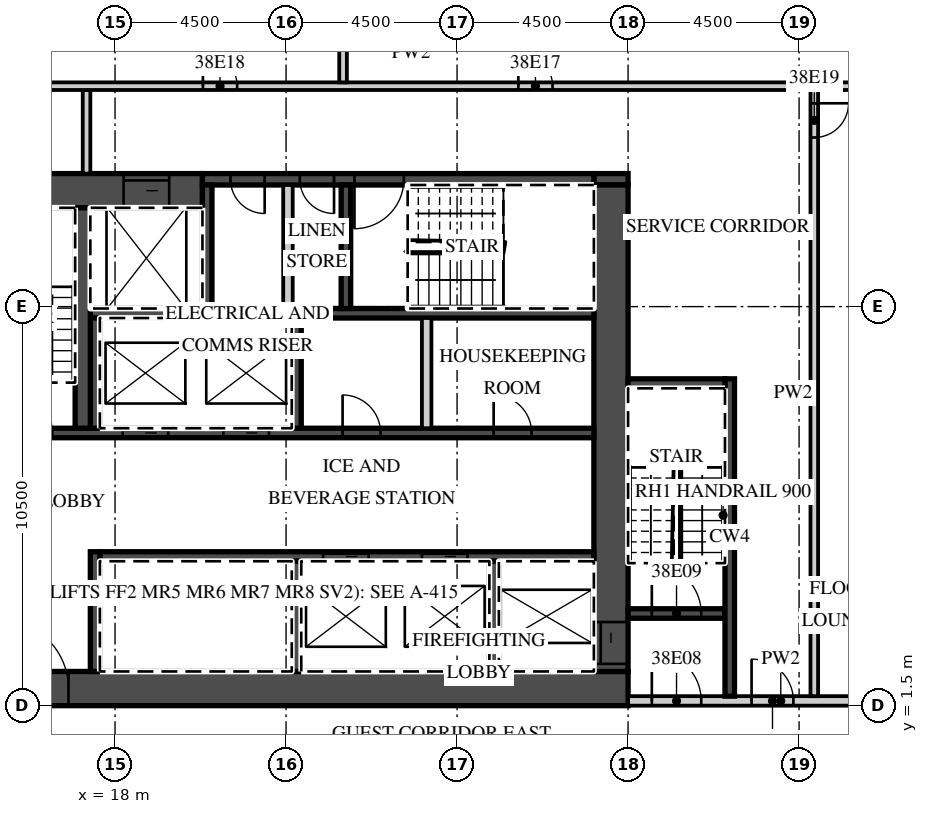
"""IFC4 building model, lengths in metres.
Left out: names, types, materials, properties, quantities, classifications, styles, units other than length and angle.
Written with IfcOpenShell. Run it as: python <this file> out.ifc"""

import sys

from ifc_helpers import new_model, si_unit, direction, frame, frame_2d, origin, place, context, subcontext, project, spatial, rectangle, extrude, element, fill, save


model = new_model("IFC4")
c1 = context("Model", 3, precision=1e-05, world=origin(), true_north=direction((0.0, 1.0)))
c2 = subcontext(c1, "Body", "Model", "MODEL_VIEW")
j1 = project(units=[si_unit("LENGTHUNIT", "METRE"), si_unit("PLANEANGLEUNIT", "RADIAN")], contexts=[c1])
p1 = place(None, origin())
s1 = spatial("IfcSite", under=j1, at=p1, CompositionType="ELEMENT")
p2 = place(p1, origin())
s2 = spatial("IfcBuilding", under=s1, at=p2, CompositionType="ELEMENT")
p3 = place(p2, frame((0.0, 0.0, 166.9)))
s3 = spatial("IfcBuildingStorey", under=s2, at=p3, CompositionType="ELEMENT", Elevation=166.9)
p4 = place(p3, frame((13.5, 1.95, 0.0), z_axis=(0.0, 0.0, 1.0), x_axis=(1.0, 0.0, 0.0)))
e1 = element("IfcWall", 1, at=p4, inside=s3, PredefinedType="SHEAR", context=c2, shape_type="SweptSolid", body=[
    extrude(rectangle(XDim=18.0, YDim=0.9, at=frame_2d((9.0, 0.0))), origin(), (0.0, 0.0, 1.0), 3.02),
])
p5 = place(p4, frame((1.475, 0.0, 0.0)))
e2 = element("IfcOpeningElement", 2, at=p5, cuts=e1, PredefinedType="OPENING", context=c2, shape_type="SweptSolid", body=[
    extrude(rectangle(XDim=1.8, YDim=2.1, at=frame_2d((0.9, 1.05))), frame((0.0, 0.46, 0.0), z_axis=(0.0, -1.0, 0.0), x_axis=(1.0, 0.0, 0.0)), (0.0, 0.0, 1.0), 0.92),
])
p6 = place(p3, frame((13.5, 15.05, 0.0), z_axis=(0.0, 0.0, 1.0), x_axis=(1.0, 0.0, 0.0)))
e3 = element("IfcWall", 3, at=p6, inside=s3, PredefinedType="SHEAR", context=c2, shape_type="SweptSolid", body=[
    extrude(rectangle(XDim=6.8, YDim=0.9, at=frame_2d((3.4, 0.0))), origin(), (0.0, 0.0, 1.0), 3.02),
])
p7 = place(p6, frame((4.725, 0.0, 0.0)))
e4 = element("IfcOpeningElement", 4, at=p7, cuts=e3, PredefinedType="OPENING", context=c2, shape_type="SweptSolid", body=[
    extrude(rectangle(XDim=1.2, YDim=2.1, at=frame_2d((0.6, 1.05))), frame((0.0, 0.46, 0.0), z_axis=(0.0, -1.0, 0.0), x_axis=(1.0, 0.0, 0.0)), (0.0, 0.0, 1.0), 0.92),
])
p8 = place(p3, frame((30.6, 15.35, 0.0), z_axis=(0.0, 0.0, 1.0), x_axis=(1.0, 0.0, 0.0)))
e5 = element("IfcWall", 5, at=p8, inside=s3, PredefinedType="SHEAR", context=c2, shape_type="SweptSolid", body=[
    extrude(rectangle(XDim=0.9, YDim=0.3, at=frame_2d((0.45, 0.0))), origin(), (0.0, 0.0, 1.0), 3.02),
])
p9 = place(p3, frame((20.3, 15.35, 0.0), z_axis=(0.0, 0.0, 1.0), x_axis=(1.0, 0.0, 0.0)))
e6 = element("IfcWall", 6, at=p9, inside=s3, PredefinedType="SHEAR", context=c2, shape_type="SweptSolid", body=[
    extrude(rectangle(XDim=10.3, YDim=0.3, at=frame_2d((5.15, 0.0))), origin(), (0.0, 0.0, 1.0), 3.02),
])
p10 = place(p9, frame((4.0, 0.0, 0.0)))
e7 = element("IfcOpeningElement", 7, at=p10, cuts=e6, PredefinedType="OPENING", context=c2, shape_type="SweptSolid", body=[
    extrude(rectangle(XDim=1.3, YDim=2.1, at=frame_2d((0.65, 1.05))), frame((0.0, 0.16, 0.0), z_axis=(0.0, -1.0, 0.0), x_axis=(1.0, 0.0, 0.0)), (0.0, 0.0, 1.0), 0.32),
])
p11 = place(p9, frame((2.562, 0.0, 0.0)))
e8 = element("IfcOpeningElement", 8, at=p11, cuts=e6, PredefinedType="OPENING", context=c2, shape_type="SweptSolid", body=[
    extrude(rectangle(XDim=0.9, YDim=2.1, at=frame_2d((0.45, 1.05))), frame((0.0, 0.16, 0.0), z_axis=(0.0, -1.0, 0.0), x_axis=(1.0, 0.0, 0.0)), (0.0, 0.0, 1.0), 0.32),
])
p12 = place(p9, frame((0.738, 0.0, 0.0)))
e9 = element("IfcOpeningElement", 9, at=p12, cuts=e6, PredefinedType="OPENING", context=c2, shape_type="SweptSolid", body=[
    extrude(rectangle(XDim=0.9, YDim=2.1, at=frame_2d((0.45, 1.05))), frame((0.0, 0.16, 0.0), z_axis=(0.0, -1.0, 0.0), x_axis=(1.0, 0.0, 0.0)), (0.0, 0.0, 1.0), 0.32),
])
p13 = place(p3, frame((31.05, 2.4, 0.0), z_axis=(0.0, 0.0, 1.0), x_axis=(0.0, 1.0, 0.0)))
e10 = element("IfcWall", 10, at=p13, inside=s3, PredefinedType="SHEAR", context=c2, shape_type="SweptSolid", body=[
    extrude(rectangle(XDim=12.8, YDim=0.9, at=frame_2d((6.4, 0.0))), origin(), (0.0, 0.0, 1.0), 3.02),
])
p14 = place(p13, frame((0.2, 0.0, 0.0)))
e11 = element("IfcOpeningElement", 11, at=p14, cuts=e10, PredefinedType="OPENING", context=c2, shape_type="SweptSolid", body=[
    extrude(rectangle(XDim=1.1, YDim=2.1, at=frame_2d((0.55, 1.05))), frame((0.0, 0.46, 0.0), z_axis=(0.0, -1.0, 0.0), x_axis=(1.0, 0.0, 0.0)), (0.0, 0.0, 1.0), 0.92),
])
p15 = place(p3, frame((17.6, 5.425, 0.0), z_axis=(0.0, 0.0, 1.0), x_axis=(1.0, 0.0, 0.0)))
e12 = element("IfcWall", 12, at=p15, inside=s3, PredefinedType="SHEAR", context=c2, shape_type="SweptSolid", body=[
    extrude(rectangle(XDim=13.0, YDim=0.25, at=frame_2d((6.5, 0.0))), origin(), (0.0, 0.0, 1.0), 3.02),
])
p16 = place(p15, frame((8.475, 0.0, 0.0)))
e13 = element("IfcOpeningElement", 13, at=p16, cuts=e12, PredefinedType="OPENING", context=c2, shape_type="SweptSolid", body=[
    extrude(rectangle(XDim=1.2, YDim=2.1, at=frame_2d((0.6, 1.05))), frame((0.0, 0.135, 0.0), z_axis=(0.0, -1.0, 0.0), x_axis=(1.0, 0.0, 0.0)), (0.0, 0.0, 1.0), 0.27),
])
p17 = place(p15, frame((5.875, 0.0, 0.0)))
e14 = element("IfcOpeningElement", 14, at=p17, cuts=e12, PredefinedType="OPENING", context=c2, shape_type="SweptSolid", body=[
    extrude(rectangle(XDim=1.2, YDim=2.1, at=frame_2d((0.6, 1.05))), frame((0.0, 0.135, 0.0), z_axis=(0.0, -1.0, 0.0), x_axis=(1.0, 0.0, 0.0)), (0.0, 0.0, 1.0), 0.27),
])
p18 = place(p3, frame((17.475, 2.4, 0.0), z_axis=(0.0, 0.0, 1.0), x_axis=(0.0, 1.0, 0.0)))
e15 = element("IfcWall", 15, at=p18, inside=s3, PredefinedType="SHEAR", context=c2, shape_type="SweptSolid", body=[
    extrude(rectangle(XDim=3.15, YDim=0.25, at=frame_2d((1.575, 0.0))), origin(), (0.0, 0.0, 1.0), 3.02),
])
for number, where, z_axis, x_axis in (
    (16, (27.975, 2.4, 0.0), (0.0, 0.0, 1.0), (0.0, 1.0, 0.0)),
    (17, (22.775, 2.4, 0.0), (0.0, 0.0, 1.0), (0.0, 1.0, 0.0)),
):
    element("IfcWall", number, at=place(p3, frame(where, z_axis=z_axis, x_axis=x_axis)), inside=s3, PredefinedType="SHEAR", context=c2, shape_type="SweptSolid", body=[
        extrude(rectangle(XDim=2.9, YDim=0.25, at=frame_2d((1.45, 0.0))), origin(), (0.0, 0.0, 1.0), 3.02),
    ])
p19 = place(p3, frame((14.4, 8.675, 0.0), z_axis=(0.0, 0.0, 1.0), x_axis=(1.0, 0.0, 0.0)))
e18 = element("IfcWall", 18, at=p19, inside=s3, PredefinedType="SHEAR", context=c2, shape_type="SweptSolid", body=[
    extrude(rectangle(XDim=16.2, YDim=0.25, at=frame_2d((8.1, 0.0))), origin(), (0.0, 0.0, 1.0), 3.02),
])
p20 = place(p19, frame((6.45, 0.0, 0.0)))
e19 = element("IfcOpeningElement", 19, at=p20, cuts=e18, PredefinedType="OPENING", context=c2, shape_type="SweptSolid", body=[
    extrude(rectangle(XDim=1.2, YDim=2.1, at=frame_2d((0.6, 1.05))), frame((0.0, 0.135, 0.0), z_axis=(0.0, -1.0, 0.0), x_axis=(1.0, 0.0, 0.0)), (0.0, 0.0, 1.0), 0.27),
])
p21 = place(p19, frame((3.8, 0.0, 0.0)))
e20 = element("IfcOpeningElement", 20, at=p21, cuts=e18, PredefinedType="OPENING", context=c2, shape_type="SweptSolid", body=[
    extrude(rectangle(XDim=1.2, YDim=2.1, at=frame_2d((0.6, 1.05))), frame((0.0, 0.135, 0.0), z_axis=(0.0, -1.0, 0.0), x_axis=(1.0, 0.0, 0.0)), (0.0, 0.0, 1.0), 0.27),
])
p22 = place(p19, frame((0.65, 0.0, 0.0)))
e21 = element("IfcOpeningElement", 21, at=p22, cuts=e18, PredefinedType="OPENING", context=c2, shape_type="SweptSolid", body=[
    extrude(rectangle(XDim=1.3, YDim=2.1, at=frame_2d((0.65, 1.05))), frame((0.0, 0.135, 0.0), z_axis=(0.0, -1.0, 0.0), x_axis=(1.0, 0.0, 0.0)), (0.0, 0.0, 1.0), 0.27),
])
p23 = place(p19, frame((13.562, 0.0, 0.0)))
e22 = element("IfcOpeningElement", 22, at=p23, cuts=e18, PredefinedType="OPENING", context=c2, shape_type="SweptSolid", body=[
    extrude(rectangle(XDim=1.0, YDim=2.1, at=frame_2d((0.5, 1.05))), frame((0.0, 0.135, 0.0), z_axis=(0.0, -1.0, 0.0), x_axis=(1.0, 0.0, 0.0)), (0.0, 0.0, 1.0), 0.27),
])
p24 = place(p19, frame((9.587, 0.0, 0.0)))
e23 = element("IfcOpeningElement", 23, at=p24, cuts=e18, PredefinedType="OPENING", context=c2, shape_type="SweptSolid", body=[
    extrude(rectangle(XDim=1.0, YDim=2.1, at=frame_2d((0.5, 1.05))), frame((0.0, 0.135, 0.0), z_axis=(0.0, -1.0, 0.0), x_axis=(1.0, 0.0, 0.0)), (0.0, 0.0, 1.0), 0.27),
])
p25 = place(p3, frame((17.35, 11.825, 0.0), z_axis=(0.0, 0.0, 1.0), x_axis=(1.0, 0.0, 0.0)))
e24 = element("IfcWall", 24, at=p25, inside=s3, PredefinedType="SHEAR", context=c2, shape_type="SweptSolid", body=[
    extrude(rectangle(XDim=13.25, YDim=0.25, at=frame_2d((6.625, 0.0))), origin(), (0.0, 0.0, 1.0), 3.02),
])
for number, where, z_axis, x_axis in (
    (25, (17.475, 8.8, 0.0), (0.0, 0.0, 1.0), (0.0, 1.0, 0.0)),
    (26, (22.775, 8.8, 0.0), (0.0, 0.0, 1.0), (0.0, 1.0, 0.0)),
):
    element("IfcWall", number, at=place(p3, frame(where, z_axis=z_axis, x_axis=x_axis)), inside=s3, PredefinedType="SHEAR", context=c2, shape_type="SweptSolid", body=[
        extrude(rectangle(XDim=2.9, YDim=0.25, at=frame_2d((1.45, 0.0))), origin(), (0.0, 0.0, 1.0), 3.02),
    ])
p26 = place(p3, frame((26.2, 8.8, 0.0), z_axis=(0.0, 0.0, 1.0), x_axis=(0.0, 1.0, 0.0)))
e27 = element("IfcWall", 27, at=p26, inside=s3, PredefinedType="PARTITIONING", context=c2, shape_type="SweptSolid", body=[
    extrude(rectangle(XDim=2.9, YDim=0.25, at=frame_2d((1.45, 0.0))), origin(), (0.0, 0.0, 1.0), 3.02),
])
p27 = place(p3, frame((17.15, 8.8, 0.0), z_axis=(0.0, 0.0, 1.0), x_axis=(0.0, 1.0, 0.0)))
e28 = element("IfcWall", 28, at=p27, inside=s3, PredefinedType="SHEAR", context=c2, shape_type="SweptSolid", body=[
    extrude(rectangle(XDim=5.8, YDim=0.4, at=frame_2d((2.9, 0.0))), origin(), (0.0, 0.0, 1.0), 3.02),
])
for number, where, z_axis, x_axis in (
    (29, (20.425, 11.95, 0.0), (0.0, 0.0, 1.0), (0.0, 1.0, 0.0)),
    (30, (24.075, 11.95, 0.0), (0.0, 0.0, 1.0), (0.0, 1.0, 0.0)),
):
    element("IfcWall", number, at=place(p3, frame(where, z_axis=z_axis, x_axis=x_axis)), inside=s3, PredefinedType="SHEAR", context=c2, shape_type="SweptSolid", body=[
        extrude(rectangle(XDim=3.25, YDim=0.25, at=frame_2d((1.625, 0.0))), origin(), (0.0, 0.0, 1.0), 3.02),
    ])
p28 = place(p3, frame((22.55, 11.95, 0.0), z_axis=(0.0, 0.0, 1.0), x_axis=(0.0, 1.0, 0.0)))
e31 = element("IfcWall", 31, at=p28, inside=s3, PredefinedType="PARTITIONING", context=c2, shape_type="SweptSolid", body=[
    extrude(rectangle(XDim=3.25, YDim=0.25, at=frame_2d((1.625, 0.0))), origin(), (0.0, 0.0, 1.0), 3.02),
])
p29 = place(p3, frame((31.5, 1.625, 0.0), z_axis=(0.0, 0.0, 1.0), x_axis=(1.0, 0.0, 0.0)))
e32 = element("IfcWall", 32, at=p29, inside=s3, PredefinedType="PARTITIONING", context=c2, shape_type="SweptSolid", body=[
    extrude(rectangle(XDim=8.035, YDim=0.25, at=frame_2d((4.018, 0.0))), origin(), (0.0, 0.0, 1.0), 3.02),
])
p30 = place(p29, frame((0.625, 0.0, 0.0)))
e33 = element("IfcOpeningElement", 33, at=p30, cuts=e32, PredefinedType="OPENING", context=c2, shape_type="SweptSolid", body=[
    extrude(rectangle(XDim=1.3, YDim=2.1, at=frame_2d((0.65, 1.05))), frame((0.0, 0.135, 0.0), z_axis=(0.0, -1.0, 0.0), x_axis=(1.0, 0.0, 0.0)), (0.0, 0.0, 1.0), 0.27),
])
p31 = place(p29, frame((3.25, 0.0, 0.0)))
e34 = element("IfcOpeningElement", 34, at=p31, cuts=e32, PredefinedType="OPENING", context=c2, shape_type="SweptSolid", body=[
    extrude(rectangle(XDim=1.1, YDim=2.1, at=frame_2d((0.55, 1.05))), frame((0.0, 0.135, 0.0), z_axis=(0.0, -1.0, 0.0), x_axis=(1.0, 0.0, 0.0)), (0.0, 0.0, 1.0), 0.27),
])
p32 = place(p3, frame((31.5, 3.925, 0.0), z_axis=(0.0, 0.0, 1.0), x_axis=(1.0, 0.0, 0.0)))
e35 = element("IfcWall", 35, at=p32, inside=s3, PredefinedType="SHEAR", context=c2, shape_type="SweptSolid", body=[
    extrude(rectangle(XDim=2.55, YDim=0.25, at=frame_2d((1.275, 0.0))), origin(), (0.0, 0.0, 1.0), 3.02),
])
p33 = place(p32, frame((0.625, 0.0, 0.0)))
e36 = element("IfcOpeningElement", 36, at=p33, cuts=e35, PredefinedType="OPENING", context=c2, shape_type="SweptSolid", body=[
    extrude(rectangle(XDim=1.3, YDim=2.1, at=frame_2d((0.65, 1.05))), frame((0.0, 0.135, 0.0), z_axis=(0.0, -1.0, 0.0), x_axis=(1.0, 0.0, 0.0)), (0.0, 0.0, 1.0), 0.27),
])
p34 = place(p3, frame((34.175, 1.75, 0.0), z_axis=(0.0, 0.0, 1.0), x_axis=(0.0, 1.0, 0.0)))
e37 = element("IfcWall", 37, at=p34, inside=s3, PredefinedType="SHEAR", context=c2, shape_type="SweptSolid", body=[
    extrude(rectangle(XDim=8.35, YDim=0.25, at=frame_2d((4.175, 0.0))), origin(), (0.0, 0.0, 1.0), 3.02),
])
p35 = place(p3, frame((31.5, 9.975, 0.0), z_axis=(0.0, 0.0, 1.0), x_axis=(1.0, 0.0, 0.0)))
e38 = element("IfcWall", 38, at=p35, inside=s3, PredefinedType="SHEAR", context=c2, shape_type="SweptSolid", body=[
    extrude(rectangle(XDim=2.55, YDim=0.25, at=frame_2d((1.275, 0.0))), origin(), (0.0, 0.0, 1.0), 3.02),
])
p36 = place(p3, frame((17.25, 15.5, 0.0), z_axis=(0.0, 0.0, 1.0), x_axis=(0.0, 1.0, 0.0)))
e39 = element("IfcWall", 39, at=p36, inside=s3, PredefinedType="PARTITIONING", context=c2, shape_type="SweptSolid", body=[
    extrude(rectangle(XDim=2.2, YDim=0.2, at=frame_2d((1.1, 0.0))), origin(), (0.0, 0.0, 1.0), 3.02),
])
p37 = place(p3, frame((36.4, 1.75, 0.0), z_axis=(0.0, 0.0, 1.0), x_axis=(0.0, 1.0, 0.0)))
e40 = element("IfcWall", 40, at=p37, inside=s3, PredefinedType="PARTITIONING", context=c2, shape_type="SweptSolid", body=[
    extrude(rectangle(XDim=15.95, YDim=0.2, at=frame_2d((7.975, 0.0))), origin(), (0.0, 0.0, 1.0), 3.02),
])
p38 = place(p37, frame((14.7, 0.0, 0.0)))
e41 = element("IfcOpeningElement", 41, at=p38, cuts=e40, PredefinedType="OPENING", context=c2, shape_type="SweptSolid", body=[
    extrude(rectangle(XDim=0.9, YDim=2.1, at=frame_2d((0.45, 1.05))), frame((0.0, 0.11, 0.0), z_axis=(0.0, -1.0, 0.0), x_axis=(1.0, 0.0, 0.0)), (0.0, 0.0, 1.0), 0.22),
])
p39 = place(p3, frame((13.6, 17.8, 0.0), z_axis=(0.0, 0.0, 1.0), x_axis=(1.0, 0.0, 0.0)))
e42 = element("IfcWall", 42, at=p39, inside=s3, PredefinedType="PARTITIONING", context=c2, shape_type="SweptSolid", body=[
    extrude(rectangle(XDim=24.378, YDim=0.2, at=frame_2d((12.189, 0.0))), origin(), (0.0, 0.0, 1.0), 3.02),
])
p40 = place(p39, frame((15.012, 0.0, 0.0)))
e43 = element("IfcOpeningElement", 43, at=p40, cuts=e42, PredefinedType="OPENING", context=c2, shape_type="SweptSolid", body=[
    extrude(rectangle(XDim=0.9, YDim=2.1, at=frame_2d((0.45, 1.05))), frame((0.0, 0.11, 0.0), z_axis=(0.0, -1.0, 0.0), x_axis=(1.0, 0.0, 0.0)), (0.0, 0.0, 1.0), 0.22),
])
p41 = place(p39, frame((6.712, 0.0, 0.0)))
e44 = element("IfcOpeningElement", 44, at=p41, cuts=e42, PredefinedType="OPENING", context=c2, shape_type="SweptSolid", body=[
    extrude(rectangle(XDim=0.9, YDim=2.1, at=frame_2d((0.45, 1.05))), frame((0.0, 0.11, 0.0), z_axis=(0.0, -1.0, 0.0), x_axis=(1.0, 0.0, 0.0)), (0.0, 0.0, 1.0), 0.22),
])
p42 = place(p3, frame((24.0, 17.9, 0.0), z_axis=(0.0, 0.0, 1.0), x_axis=(0.0, 1.0, 0.0)))
e45 = element("IfcWall", 45, at=p42, inside=s3, PredefinedType="PARTITIONING", context=c2, shape_type="SweptSolid", body=[
    extrude(rectangle(XDim=4.701, YDim=0.2, at=frame_2d((2.351, 0.0))), origin(), (0.0, 0.0, 1.0), 3.02),
])
p43 = place(p20, origin())
e46 = element("IfcDoor", 46, at=p43, inside=s3, OperationType="SLIDING_TO_LEFT", PredefinedType="DOOR", context=c2, shape_type="SweptSolid", body=[
    extrude(rectangle(XDim=1.2, YDim=2.1, at=frame_2d((0.6, 1.05))), frame((0.0, 0.025, 0.0), z_axis=(0.0, -1.0, 0.0), x_axis=(1.0, 0.0, 0.0)), (0.0, 0.0, 1.0), 0.05),
])
fill(e19, e46)
p44 = place(p21, origin())
e47 = element("IfcDoor", 47, at=p44, inside=s3, OperationType="SLIDING_TO_RIGHT", PredefinedType="DOOR", context=c2, shape_type="SweptSolid", body=[
    extrude(rectangle(XDim=1.2, YDim=2.1, at=frame_2d((0.6, 1.05))), frame((0.0, 0.025, 0.0), z_axis=(0.0, -1.0, 0.0), x_axis=(1.0, 0.0, 0.0)), (0.0, 0.0, 1.0), 0.05),
])
fill(e20, e47)
p45 = place(p16, origin())
e48 = element("IfcDoor", 48, at=p45, inside=s3, OperationType="SLIDING_TO_LEFT", PredefinedType="DOOR", context=c2, shape_type="SweptSolid", body=[
    extrude(rectangle(XDim=1.2, YDim=2.1, at=frame_2d((0.6, 1.05))), frame((0.0, 0.025, 0.0), z_axis=(0.0, -1.0, 0.0), x_axis=(1.0, 0.0, 0.0)), (0.0, 0.0, 1.0), 0.05),
])
fill(e13, e48)
p46 = place(p17, origin())
e49 = element("IfcDoor", 49, at=p46, inside=s3, OperationType="SLIDING_TO_RIGHT", PredefinedType="DOOR", context=c2, shape_type="SweptSolid", body=[
    extrude(rectangle(XDim=1.2, YDim=2.1, at=frame_2d((0.6, 1.05))), frame((0.0, 0.025, 0.0), z_axis=(0.0, -1.0, 0.0), x_axis=(1.0, 0.0, 0.0)), (0.0, 0.0, 1.0), 0.05),
])
fill(e14, e49)
p47 = place(p7, origin())
e50 = element("IfcDoor", 50, at=p47, inside=s3, OperationType="SLIDING_TO_LEFT", PredefinedType="DOOR", context=c2, shape_type="SweptSolid", body=[
    extrude(rectangle(XDim=1.2, YDim=2.1, at=frame_2d((0.6, 1.05))), frame((0.0, 0.025, 0.0), z_axis=(0.0, -1.0, 0.0), x_axis=(1.0, 0.0, 0.0)), (0.0, 0.0, 1.0), 0.05),
])
fill(e4, e50)
p48 = place(p14, origin())
e51 = element("IfcDoor", 51, at=p48, inside=s3, OperationType="SLIDING_TO_LEFT", PredefinedType="DOOR", context=c2, shape_type="SweptSolid", body=[
    extrude(rectangle(XDim=1.1, YDim=2.1, at=frame_2d((0.55, 1.05))), frame((0.0, 0.025, 0.0), z_axis=(0.0, -1.0, 0.0), x_axis=(1.0, 0.0, 0.0)), (0.0, 0.0, 1.0), 0.05),
])
fill(e11, e51)
p49 = place(p5, origin())
e52 = element("IfcDoor", 52, at=p49, inside=s3, OperationType="DOUBLE_DOOR_DOUBLE_SWING", PredefinedType="DOOR", context=c2, shape_type="SweptSolid", body=[
    extrude(rectangle(XDim=1.8, YDim=2.1, at=frame_2d((0.9, 1.05))), frame((0.0, 0.025, 0.0), z_axis=(0.0, -1.0, 0.0), x_axis=(1.0, 0.0, 0.0)), (0.0, 0.0, 1.0), 0.05),
])
fill(e2, e52)
p50 = place(p30, origin())
e53 = element("IfcDoor", 53, at=p50, inside=s3, OperationType="SINGLE_SWING_LEFT", PredefinedType="DOOR", context=c2, shape_type="SweptSolid", body=[
    extrude(rectangle(XDim=1.3, YDim=2.1, at=frame_2d((0.65, 1.05))), frame((0.0, 0.025, 0.0), z_axis=(0.0, -1.0, 0.0), x_axis=(1.0, 0.0, 0.0)), (0.0, 0.0, 1.0), 0.05),
])
fill(e33, e53)
p51 = place(p33, origin())
e54 = element("IfcDoor", 54, at=p51, inside=s3, OperationType="SINGLE_SWING_LEFT", PredefinedType="DOOR", context=c2, shape_type="SweptSolid", body=[
    extrude(rectangle(XDim=1.3, YDim=2.1, at=frame_2d((0.65, 1.05))), frame((0.0, 0.025, 0.0), z_axis=(0.0, -1.0, 0.0), x_axis=(1.0, 0.0, 0.0)), (0.0, 0.0, 1.0), 0.05),
])
fill(e36, e54)
p52 = place(p31, origin())
e55 = element("IfcDoor", 55, at=p52, inside=s3, OperationType="SINGLE_SWING_LEFT", PredefinedType="DOOR", context=c2, shape_type="SweptSolid", body=[
    extrude(rectangle(XDim=1.1, YDim=2.1, at=frame_2d((0.55, 1.05))), frame((0.0, 0.025, 0.0), z_axis=(0.0, -1.0, 0.0), x_axis=(1.0, 0.0, 0.0)), (0.0, 0.0, 1.0), 0.05),
])
fill(e34, e55)
p53 = place(p10, origin())
e56 = element("IfcDoor", 56, at=p53, inside=s3, OperationType="SINGLE_SWING_LEFT", PredefinedType="DOOR", context=c2, shape_type="SweptSolid", body=[
    extrude(rectangle(XDim=1.3, YDim=2.1, at=frame_2d((0.65, 1.05))), frame((0.0, 0.025, 0.0), z_axis=(0.0, -1.0, 0.0), x_axis=(1.0, 0.0, 0.0)), (0.0, 0.0, 1.0), 0.05),
])
fill(e7, e56)
p54 = place(p11, origin())
e57 = element("IfcDoor", 57, at=p54, inside=s3, OperationType="SINGLE_SWING_RIGHT", PredefinedType="DOOR", context=c2, shape_type="SweptSolid", body=[
    extrude(rectangle(XDim=0.9, YDim=2.1, at=frame_2d((0.45, 1.05))), frame((0.0, 0.025, 0.0), z_axis=(0.0, -1.0, 0.0), x_axis=(1.0, 0.0, 0.0)), (0.0, 0.0, 1.0), 0.05),
])
fill(e8, e57)
p55 = place(p12, origin())
e58 = element("IfcDoor", 58, at=p55, inside=s3, OperationType="SINGLE_SWING_RIGHT", PredefinedType="DOOR", context=c2, shape_type="SweptSolid", body=[
    extrude(rectangle(XDim=0.9, YDim=2.1, at=frame_2d((0.45, 1.05))), frame((0.0, 0.025, 0.0), z_axis=(0.0, -1.0, 0.0), x_axis=(1.0, 0.0, 0.0)), (0.0, 0.0, 1.0), 0.05),
])
fill(e9, e58)
p56 = place(p23, origin())
e59 = element("IfcDoor", 59, at=p56, inside=s3, OperationType="SINGLE_SWING_LEFT", PredefinedType="DOOR", context=c2, shape_type="SweptSolid", body=[
    extrude(rectangle(XDim=1.0, YDim=2.1, at=frame_2d((0.5, 1.05))), frame((0.0, 0.025, 0.0), z_axis=(0.0, -1.0, 0.0), x_axis=(1.0, 0.0, 0.0)), (0.0, 0.0, 1.0), 0.05),
])
fill(e22, e59)
p57 = place(p24, origin())
e60 = element("IfcDoor", 60, at=p57, inside=s3, OperationType="SINGLE_SWING_LEFT", PredefinedType="DOOR", context=c2, shape_type="SweptSolid", body=[
    extrude(rectangle(XDim=1.0, YDim=2.1, at=frame_2d((0.5, 1.05))), frame((0.0, 0.025, 0.0), z_axis=(0.0, -1.0, 0.0), x_axis=(1.0, 0.0, 0.0)), (0.0, 0.0, 1.0), 0.05),
])
fill(e23, e60)
p58 = place(p40, origin())
e61 = element("IfcDoor", 61, at=p58, inside=s3, OperationType="SINGLE_SWING_LEFT", PredefinedType="DOOR", context=c2, shape_type="SweptSolid", body=[
    extrude(rectangle(XDim=0.9, YDim=2.1, at=frame_2d((0.45, 1.05))), frame((0.0, 0.025, 0.0), z_axis=(0.0, -1.0, 0.0), x_axis=(1.0, 0.0, 0.0)), (0.0, 0.0, 1.0), 0.05),
])
fill(e43, e61)
p59 = place(p41, origin())
e62 = element("IfcDoor", 62, at=p59, inside=s3, OperationType="SINGLE_SWING_LEFT", PredefinedType="DOOR", context=c2, shape_type="SweptSolid", body=[
    extrude(rectangle(XDim=0.9, YDim=2.1, at=frame_2d((0.45, 1.05))), frame((0.0, 0.025, 0.0), z_axis=(0.0, -1.0, 0.0), x_axis=(1.0, 0.0, 0.0)), (0.0, 0.0, 1.0), 0.05),
])
fill(e44, e62)
p60 = place(p38, origin())
e63 = element("IfcDoor", 63, at=p60, inside=s3, OperationType="SINGLE_SWING_RIGHT", PredefinedType="DOOR", context=c2, shape_type="SweptSolid", body=[
    extrude(rectangle(XDim=0.9, YDim=2.1, at=frame_2d((0.45, 1.05))), frame((0.0, 0.025, 0.0), z_axis=(0.0, -1.0, 0.0), x_axis=(1.0, 0.0, 0.0)), (0.0, 0.0, 1.0), 0.05),
])
fill(e41, e63)
save(model, sys.argv[1])
